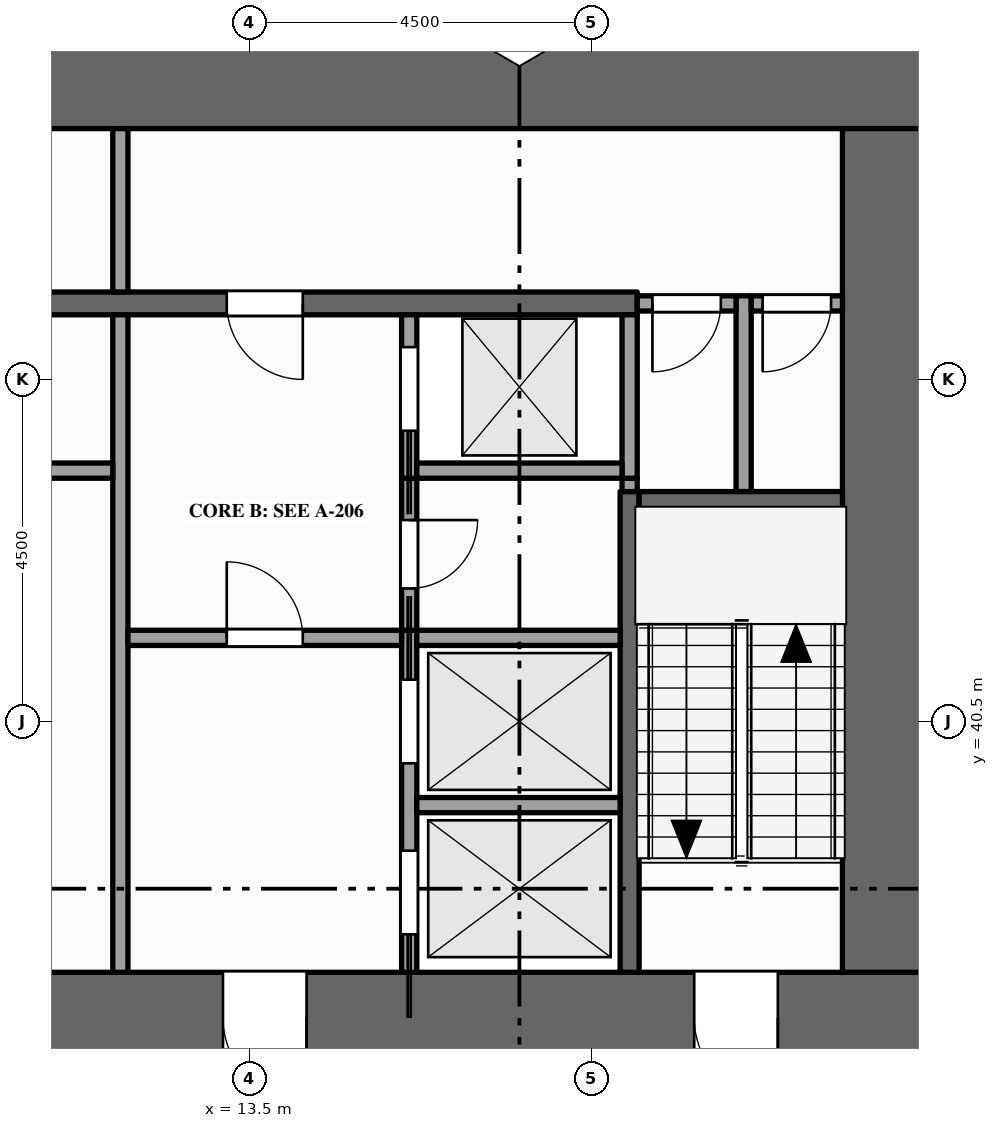
"""IFC4 building model, lengths in metres.
Left out: names, types, materials, properties, quantities, classifications, styles, units other than length and angle.
Written with IfcOpenShell. Run it as: python <this file> out.ifc"""

import sys

from ifc_helpers import new_model, si_unit, direction, frame, frame_2d, origin, place, context, subcontext, project, spatial, rectangle, extrude, element, fill, save


model = new_model("IFC4")
c1 = context("Model", 3, precision=1e-05, world=origin(), true_north=direction((0.0, 1.0)))
c2 = subcontext(c1, "Body", "Model", "MODEL_VIEW")
j1 = project(units=[si_unit("LENGTHUNIT", "METRE"), si_unit("PLANEANGLEUNIT", "RADIAN")], contexts=[c1])
p1 = place(None, origin())
s1 = spatial("IfcSite", under=j1, at=p1, CompositionType="ELEMENT")
p2 = place(p1, origin())
s2 = spatial("IfcBuilding", under=s1, at=p2, CompositionType="ELEMENT")
p3 = place(p2, frame((0.0, 0.0, 29.0)))
s3 = spatial("IfcBuildingStorey", under=s2, at=p3, CompositionType="ELEMENT", Elevation=29.0)
p4 = place(p3, frame((0.0, 36.6, -0.15), z_axis=(0.0, 0.0, 1.0), x_axis=(1.0, 0.0, 0.0)))
e1 = element("IfcWall", 1, at=p4, inside=s3, PredefinedType="SHEAR", context=c2, shape_type="SweptSolid", body=[
    extrude(rectangle(XDim=22.5, YDim=1.2, at=frame_2d((11.25, 0.0))), origin(), (0.0, 0.0, 1.0), 4.0),
])
p5 = place(p4, frame((7.1, 0.0, 0.15)))
e2 = element("IfcOpeningElement", 2, at=p5, cuts=e1, PredefinedType="OPENING", context=c2, shape_type="SweptSolid", body=[
    extrude(rectangle(XDim=1.8, YDim=2.1, at=frame_2d((0.9, 1.05))), frame((0.0, 0.61, 0.0), z_axis=(0.0, -1.0, 0.0), x_axis=(1.0, 0.0, 0.0)), (0.0, 0.0, 1.0), 1.22),
])
p6 = place(p4, frame((13.15, 0.0, 0.15)))
e3 = element("IfcOpeningElement", 3, at=p6, cuts=e1, PredefinedType="OPENING", context=c2, shape_type="SweptSolid", body=[
    extrude(rectangle(XDim=1.1, YDim=2.1, at=frame_2d((0.55, 1.05))), frame((0.0, 0.61, 0.0), z_axis=(0.0, -1.0, 0.0), x_axis=(1.0, 0.0, 0.0)), (0.0, 0.0, 1.0), 1.22),
])
p7 = place(p4, frame((2.15, 0.0, 0.15)))
e4 = element("IfcOpeningElement", 4, at=p7, cuts=e1, PredefinedType="OPENING", context=c2, shape_type="SweptSolid", body=[
    extrude(rectangle(XDim=1.1, YDim=2.1, at=frame_2d((0.55, 1.05))), frame((0.0, 0.61, 0.0), z_axis=(0.0, -1.0, 0.0), x_axis=(1.0, 0.0, 0.0)), (0.0, 0.0, 1.0), 1.22),
])
p8 = place(p4, frame((19.35, 0.0, 0.15)))
e5 = element("IfcOpeningElement", 5, at=p8, cuts=e1, PredefinedType="OPENING", context=c2, shape_type="SweptSolid", body=[
    extrude(rectangle(XDim=1.1, YDim=2.1, at=frame_2d((0.55, 1.05))), frame((0.0, 0.61, 0.0), z_axis=(0.0, -1.0, 0.0), x_axis=(1.0, 0.0, 0.0)), (0.0, 0.0, 1.0), 1.22),
])
p9 = place(p3, frame((0.0, 48.9, -0.15), z_axis=(0.0, 0.0, 1.0), x_axis=(1.0, 0.0, 0.0)))
e6 = element("IfcWall", 6, at=p9, inside=s3, PredefinedType="SHEAR", context=c2, shape_type="SweptSolid", body=[
    extrude(rectangle(XDim=22.5, YDim=1.2, at=frame_2d((11.25, 0.0))), origin(), (0.0, 0.0, 1.0), 4.0),
])
p10 = place(p3, frame((21.9, 37.2, -0.15), z_axis=(0.0, 0.0, 1.0), x_axis=(0.0, 1.0, 0.0)))
e7 = element("IfcWall", 7, at=p10, inside=s3, PredefinedType="SHEAR", context=c2, shape_type="SweptSolid", body=[
    extrude(rectangle(XDim=11.1, YDim=1.2, at=frame_2d((5.55, 0.0))), origin(), (0.0, 0.0, 1.0), 4.0),
])
p11 = place(p3, frame((11.8, 37.2, 0.0), z_axis=(0.0, 0.0, 1.0), x_axis=(0.0, 1.0, 0.0)))
e8 = element("IfcWall", 8, at=p11, inside=s3, PredefinedType="PARTITIONING", context=c2, shape_type="SweptSolid", body=[
    extrude(rectangle(XDim=8.65, YDim=0.2, at=frame_2d((4.325, 0.0))), origin(), (0.0, 0.0, 1.0), 3.85),
])
p12 = place(p3, frame((11.8, 46.15, 0.0), z_axis=(0.0, 0.0, 1.0), x_axis=(0.0, 1.0, 0.0)))
e9 = element("IfcWall", 9, at=p12, inside=s3, PredefinedType="PARTITIONING", context=c2, shape_type="SweptSolid", body=[
    extrude(rectangle(XDim=2.15, YDim=0.2, at=frame_2d((1.075, 0.0))), origin(), (0.0, 0.0, 1.0), 3.85),
])
p13 = place(p3, frame((15.6, 37.2, 0.0), z_axis=(0.0, 0.0, 1.0), x_axis=(0.0, 1.0, 0.0)))
e10 = element("IfcWall", 10, at=p13, inside=s3, PredefinedType="SOLIDWALL", context=c2, shape_type="SweptSolid", body=[
    extrude(rectangle(XDim=4.5, YDim=0.2, at=frame_2d((2.25, 0.0))), origin(), (0.0, 0.0, 1.0), 3.85),
])
p14 = place(p13, frame((0.5, 0.0, 0.012)))
e11 = element("IfcOpeningElement", 11, at=p14, cuts=e10, PredefinedType="OPENING", context=c2, shape_type="SweptSolid", body=[
    extrude(rectangle(XDim=1.1, YDim=2.1, at=frame_2d((0.55, 1.05))), frame((0.0, 0.11, 0.0), z_axis=(0.0, -1.0, 0.0), x_axis=(1.0, 0.0, 0.0)), (0.0, 0.0, 1.0), 0.22),
])
p15 = place(p13, frame((2.75, 0.0, 0.012)))
e12 = element("IfcOpeningElement", 12, at=p15, cuts=e10, PredefinedType="OPENING", context=c2, shape_type="SweptSolid", body=[
    extrude(rectangle(XDim=1.1, YDim=2.1, at=frame_2d((0.55, 1.05))), frame((0.0, 0.11, 0.0), z_axis=(0.0, -1.0, 0.0), x_axis=(1.0, 0.0, 0.0)), (0.0, 0.0, 1.0), 0.22),
])
p16 = place(p3, frame((15.6, 41.7, 0.0), z_axis=(0.0, 0.0, 1.0), x_axis=(0.0, 1.0, 0.0)))
e13 = element("IfcWall", 13, at=p16, inside=s3, PredefinedType="PARTITIONING", context=c2, shape_type="SweptSolid", body=[
    extrude(rectangle(XDim=2.0, YDim=0.2, at=frame_2d((1.0, 0.0))), origin(), (0.0, 0.0, 1.0), 3.85),
])
p17 = place(p16, frame((0.55, 0.0, 0.0)))
e14 = element("IfcOpeningElement", 14, at=p17, cuts=e13, PredefinedType="OPENING", context=c2, shape_type="SweptSolid", body=[
    extrude(rectangle(XDim=0.9, YDim=2.1, at=frame_2d((0.45, 1.05))), frame((0.0, 0.11, 0.0), z_axis=(0.0, -1.0, 0.0), x_axis=(1.0, 0.0, 0.0)), (0.0, 0.0, 1.0), 0.22),
])
p18 = place(p3, frame((15.6, 43.7, 0.0), z_axis=(0.0, 0.0, 1.0), x_axis=(0.0, 1.0, 0.0)))
e15 = element("IfcWall", 15, at=p18, inside=s3, PredefinedType="SOLIDWALL", context=c2, shape_type="SweptSolid", body=[
    extrude(rectangle(XDim=2.15, YDim=0.2, at=frame_2d((1.075, 0.0))), origin(), (0.0, 0.0, 1.0), 3.85),
])
p19 = place(p18, frame((0.625, 0.0, 0.012)))
e16 = element("IfcOpeningElement", 16, at=p19, cuts=e15, PredefinedType="OPENING", context=c2, shape_type="SweptSolid", body=[
    extrude(rectangle(XDim=1.1, YDim=2.1, at=frame_2d((0.55, 1.05))), frame((0.0, 0.11, 0.0), z_axis=(0.0, -1.0, 0.0), x_axis=(1.0, 0.0, 0.0)), (0.0, 0.0, 1.0), 0.22),
])
p20 = place(p3, frame((18.5, 37.2, 0.0), z_axis=(0.0, 0.0, 1.0), x_axis=(0.0, 1.0, 0.0)))
e17 = element("IfcWall", 17, at=p20, inside=s3, PredefinedType="SHEAR", context=c2, shape_type="SweptSolid", body=[
    extrude(rectangle(XDim=6.325, YDim=0.25, at=frame_2d((3.163, 0.0))), origin(), (0.0, 0.0, 1.0), 3.85),
])
p21 = place(p3, frame((18.5, 43.525, 0.0), z_axis=(0.0, 0.0, 1.0), x_axis=(0.0, 1.0, 0.0)))
e18 = element("IfcWall", 18, at=p21, inside=s3, PredefinedType="PARTITIONING", context=c2, shape_type="SweptSolid", body=[
    extrude(rectangle(XDim=0.175, YDim=0.2, at=frame_2d((0.087, 0.0))), origin(), (0.0, 0.0, 1.0), 3.85),
])
p22 = place(p3, frame((18.5, 43.7, 0.0), z_axis=(0.0, 0.0, 1.0), x_axis=(0.0, 1.0, 0.0)))
e19 = element("IfcWall", 19, at=p22, inside=s3, PredefinedType="SOLIDWALL", context=c2, shape_type="SweptSolid", body=[
    extrude(rectangle(XDim=2.15, YDim=0.2, at=frame_2d((1.075, 0.0))), origin(), (0.0, 0.0, 1.0), 3.85),
])
p23 = place(p3, frame((20.0, 43.525, 0.0), z_axis=(0.0, 0.0, 1.0), x_axis=(0.0, 1.0, 0.0)))
e20 = element("IfcWall", 20, at=p23, inside=s3, PredefinedType="PARTITIONING", context=c2, shape_type="SweptSolid", body=[
    extrude(rectangle(XDim=2.575, YDim=0.2, at=frame_2d((1.288, 0.0))), origin(), (0.0, 0.0, 1.0), 3.85),
])
p24 = place(p3, frame((15.7, 39.4, 0.0), z_axis=(0.0, 0.0, 1.0), x_axis=(1.0, 0.0, 0.0)))
e21 = element("IfcWall", 21, at=p24, inside=s3, PredefinedType="SOLIDWALL", context=c2, shape_type="SweptSolid", body=[
    extrude(rectangle(XDim=2.675, YDim=0.2, at=frame_2d((1.337, 0.0))), origin(), (0.0, 0.0, 1.0), 3.85),
])
p25 = place(p3, frame((11.9, 41.6, 0.0), z_axis=(0.0, 0.0, 1.0), x_axis=(1.0, 0.0, 0.0)))
e22 = element("IfcWall", 22, at=p25, inside=s3, PredefinedType="PARTITIONING", context=c2, shape_type="SweptSolid", body=[
    extrude(rectangle(XDim=3.6, YDim=0.2, at=frame_2d((1.8, 0.0))), origin(), (0.0, 0.0, 1.0), 3.85),
])
p26 = place(p25, frame((1.3, 0.0, 0.0)))
e23 = element("IfcOpeningElement", 23, at=p26, cuts=e22, PredefinedType="OPENING", context=c2, shape_type="SweptSolid", body=[
    extrude(rectangle(XDim=1.0, YDim=2.1, at=frame_2d((0.5, 1.05))), frame((0.0, 0.11, 0.0), z_axis=(0.0, -1.0, 0.0), x_axis=(1.0, 0.0, 0.0)), (0.0, 0.0, 1.0), 0.22),
])
p27 = place(p3, frame((15.7, 41.6, 0.0), z_axis=(0.0, 0.0, 1.0), x_axis=(1.0, 0.0, 0.0)))
e24 = element("IfcWall", 24, at=p27, inside=s3, PredefinedType="SOLIDWALL", context=c2, shape_type="SweptSolid", body=[
    extrude(rectangle(XDim=2.675, YDim=0.2, at=frame_2d((1.337, 0.0))), origin(), (0.0, 0.0, 1.0), 3.85),
])
p28 = place(p3, frame((18.625, 43.4, 0.0), z_axis=(0.0, 0.0, 1.0), x_axis=(1.0, 0.0, 0.0)))
e25 = element("IfcWall", 25, at=p28, inside=s3, PredefinedType="SHEAR", context=c2, shape_type="SweptSolid", body=[
    extrude(rectangle(XDim=2.675, YDim=0.25, at=frame_2d((1.337, 0.0))), origin(), (0.0, 0.0, 1.0), 3.85),
])
p29 = place(p3, frame((9.5, 43.8, 0.0), z_axis=(0.0, 0.0, 1.0), x_axis=(1.0, 0.0, 0.0)))
e26 = element("IfcWall", 26, at=p29, inside=s3, PredefinedType="PARTITIONING", context=c2, shape_type="SweptSolid", body=[
    extrude(rectangle(XDim=2.2, YDim=0.2, at=frame_2d((1.1, 0.0))), origin(), (0.0, 0.0, 1.0), 3.85),
])
p30 = place(p3, frame((15.7, 43.8, 0.0), z_axis=(0.0, 0.0, 1.0), x_axis=(1.0, 0.0, 0.0)))
e27 = element("IfcWall", 27, at=p30, inside=s3, PredefinedType="SOLIDWALL", context=c2, shape_type="SweptSolid", body=[
    extrude(rectangle(XDim=2.7, YDim=0.2, at=frame_2d((1.35, 0.0))), origin(), (0.0, 0.0, 1.0), 3.85),
])
p31 = place(p3, frame((4.1, 46.0, 0.0), z_axis=(0.0, 0.0, 1.0), x_axis=(1.0, 0.0, 0.0)))
e28 = element("IfcWall", 28, at=p31, inside=s3, PredefinedType="SHEAR", context=c2, shape_type="SweptSolid", body=[
    extrude(rectangle(XDim=14.5, YDim=0.3, at=frame_2d((7.25, 0.0))), origin(), (0.0, 0.0, 1.0), 3.85),
])
p32 = place(p31, frame((3.4, 0.0, 0.0)))
e29 = element("IfcOpeningElement", 29, at=p32, cuts=e28, PredefinedType="OPENING", context=c2, shape_type="SweptSolid", body=[
    extrude(rectangle(XDim=1.0, YDim=2.1, at=frame_2d((0.5, 1.05))), frame((0.0, 0.16, 0.0), z_axis=(0.0, -1.0, 0.0), x_axis=(1.0, 0.0, 0.0)), (0.0, 0.0, 1.0), 0.32),
])
p33 = place(p31, frame((9.1, 0.0, 0.0)))
e30 = element("IfcOpeningElement", 30, at=p33, cuts=e28, PredefinedType="OPENING", context=c2, shape_type="SweptSolid", body=[
    extrude(rectangle(XDim=1.0, YDim=2.1, at=frame_2d((0.5, 1.05))), frame((0.0, 0.16, 0.0), z_axis=(0.0, -1.0, 0.0), x_axis=(1.0, 0.0, 0.0)), (0.0, 0.0, 1.0), 0.32),
])
p34 = place(p3, frame((18.6, 46.0, 0.0), z_axis=(0.0, 0.0, 1.0), x_axis=(1.0, 0.0, 0.0)))
e31 = element("IfcWall", 31, at=p34, inside=s3, PredefinedType="PARTITIONING", context=c2, shape_type="SweptSolid", body=[
    extrude(rectangle(XDim=1.3, YDim=0.2, at=frame_2d((0.65, 0.0))), origin(), (0.0, 0.0, 1.0), 3.85),
])
p35 = place(p34, frame((0.2, 0.0, 0.0)))
e32 = element("IfcOpeningElement", 32, at=p35, cuts=e31, PredefinedType="OPENING", context=c2, shape_type="SweptSolid", body=[
    extrude(rectangle(XDim=0.9, YDim=2.1, at=frame_2d((0.45, 1.05))), frame((0.0, 0.11, 0.0), z_axis=(0.0, -1.0, 0.0), x_axis=(1.0, 0.0, 0.0)), (0.0, 0.0, 1.0), 0.22),
])
p36 = place(p3, frame((20.1, 46.0, 0.0), z_axis=(0.0, 0.0, 1.0), x_axis=(1.0, 0.0, 0.0)))
e33 = element("IfcWall", 33, at=p36, inside=s3, PredefinedType="PARTITIONING", context=c2, shape_type="SweptSolid", body=[
    extrude(rectangle(XDim=1.2, YDim=0.2, at=frame_2d((0.6, 0.0))), origin(), (0.0, 0.0, 1.0), 3.85),
])
p37 = place(p36, frame((0.15, 0.0, 0.0)))
e34 = element("IfcOpeningElement", 34, at=p37, cuts=e33, PredefinedType="OPENING", context=c2, shape_type="SweptSolid", body=[
    extrude(rectangle(XDim=0.9, YDim=2.1, at=frame_2d((0.45, 1.05))), frame((0.0, 0.11, 0.0), z_axis=(0.0, -1.0, 0.0), x_axis=(1.0, 0.0, 0.0)), (0.0, 0.0, 1.0), 0.22),
])
p38 = place(p14, origin())
e35 = element("IfcDoor", 35, at=p38, inside=s3, OperationType="SLIDING_TO_LEFT", PredefinedType="DOOR", context=c2, shape_type="SweptSolid", body=[
    extrude(rectangle(XDim=1.1, YDim=2.1, at=frame_2d((0.55, 1.05))), frame((0.0, 0.025, 0.0), z_axis=(0.0, -1.0, 0.0), x_axis=(1.0, 0.0, 0.0)), (0.0, 0.0, 1.0), 0.05),
])
fill(e11, e35)
p39 = place(p15, origin())
e36 = element("IfcDoor", 36, at=p39, inside=s3, OperationType="SLIDING_TO_RIGHT", PredefinedType="DOOR", context=c2, shape_type="SweptSolid", body=[
    extrude(rectangle(XDim=1.1, YDim=2.1, at=frame_2d((0.55, 1.05))), frame((0.0, 0.025, 0.0), z_axis=(0.0, -1.0, 0.0), x_axis=(1.0, 0.0, 0.0)), (0.0, 0.0, 1.0), 0.05),
])
fill(e12, e36)
p40 = place(p19, origin())
e37 = element("IfcDoor", 37, at=p40, inside=s3, OperationType="SLIDING_TO_LEFT", PredefinedType="DOOR", context=c2, shape_type="SweptSolid", body=[
    extrude(rectangle(XDim=1.1, YDim=2.1, at=frame_2d((0.55, 1.05))), frame((0.0, 0.025, 0.0), z_axis=(0.0, -1.0, 0.0), x_axis=(1.0, 0.0, 0.0)), (0.0, 0.0, 1.0), 0.05),
])
fill(e16, e37)
p41 = place(p6, origin())
e38 = element("IfcDoor", 38, at=p41, inside=s3, OperationType="SINGLE_SWING_RIGHT", PredefinedType="DOOR", context=c2, shape_type="SweptSolid", body=[
    extrude(rectangle(XDim=1.1, YDim=2.1, at=frame_2d((0.55, 1.05))), frame((0.0, 0.025, 0.0), z_axis=(0.0, -1.0, 0.0), x_axis=(1.0, 0.0, 0.0)), (0.0, 0.0, 1.0), 0.05),
])
fill(e3, e38)
p42 = place(p26, origin())
e39 = element("IfcDoor", 39, at=p42, inside=s3, OperationType="SINGLE_SWING_LEFT", PredefinedType="DOOR", context=c2, shape_type="SweptSolid", body=[
    extrude(rectangle(XDim=1.0, YDim=2.1, at=frame_2d((0.5, 1.05))), frame((0.0, 0.025, 0.0), z_axis=(0.0, -1.0, 0.0), x_axis=(1.0, 0.0, 0.0)), (0.0, 0.0, 1.0), 0.05),
])
fill(e23, e39)
p43 = place(p33, origin())
e40 = element("IfcDoor", 40, at=p43, inside=s3, OperationType="SINGLE_SWING_RIGHT", PredefinedType="DOOR", context=c2, shape_type="SweptSolid", body=[
    extrude(rectangle(XDim=1.0, YDim=2.1, at=frame_2d((0.5, 1.05))), frame((0.0, 0.025, 0.0), z_axis=(0.0, -1.0, 0.0), x_axis=(1.0, 0.0, 0.0)), (0.0, 0.0, 1.0), 0.05),
])
fill(e30, e40)
p44 = place(p8, origin())
e41 = element("IfcDoor", 41, at=p44, inside=s3, OperationType="SINGLE_SWING_RIGHT", PredefinedType="DOOR", context=c2, shape_type="SweptSolid", body=[
    extrude(rectangle(XDim=1.1, YDim=2.1, at=frame_2d((0.55, 1.05))), frame((0.0, 0.025, 0.0), z_axis=(0.0, -1.0, 0.0), x_axis=(1.0, 0.0, 0.0)), (0.0, 0.0, 1.0), 0.05),
])
fill(e5, e41)
p45 = place(p35, origin())
e42 = element("IfcDoor", 42, at=p45, inside=s3, OperationType="SINGLE_SWING_LEFT", PredefinedType="DOOR", context=c2, shape_type="SweptSolid", body=[
    extrude(rectangle(XDim=0.9, YDim=2.1, at=frame_2d((0.45, 1.05))), frame((0.0, 0.025, 0.0), z_axis=(0.0, -1.0, 0.0), x_axis=(1.0, 0.0, 0.0)), (0.0, 0.0, 1.0), 0.05),
])
fill(e32, e42)
p46 = place(p37, origin())
e43 = element("IfcDoor", 43, at=p46, inside=s3, OperationType="SINGLE_SWING_LEFT", PredefinedType="DOOR", context=c2, shape_type="SweptSolid", body=[
    extrude(rectangle(XDim=0.9, YDim=2.1, at=frame_2d((0.45, 1.05))), frame((0.0, 0.025, 0.0), z_axis=(0.0, -1.0, 0.0), x_axis=(1.0, 0.0, 0.0)), (0.0, 0.0, 1.0), 0.05),
])
fill(e34, e43)
p47 = place(p17, origin())
e44 = element("IfcDoor", 44, at=p47, inside=s3, OperationType="SINGLE_SWING_RIGHT", PredefinedType="DOOR", context=c2, shape_type="SweptSolid", body=[
    extrude(rectangle(XDim=0.9, YDim=2.1, at=frame_2d((0.45, 1.05))), frame((0.0, 0.025, 0.0), z_axis=(0.0, -1.0, 0.0), x_axis=(1.0, 0.0, 0.0)), (0.0, 0.0, 1.0), 0.05),
])
fill(e14, e44)
save(model, sys.argv[1])
